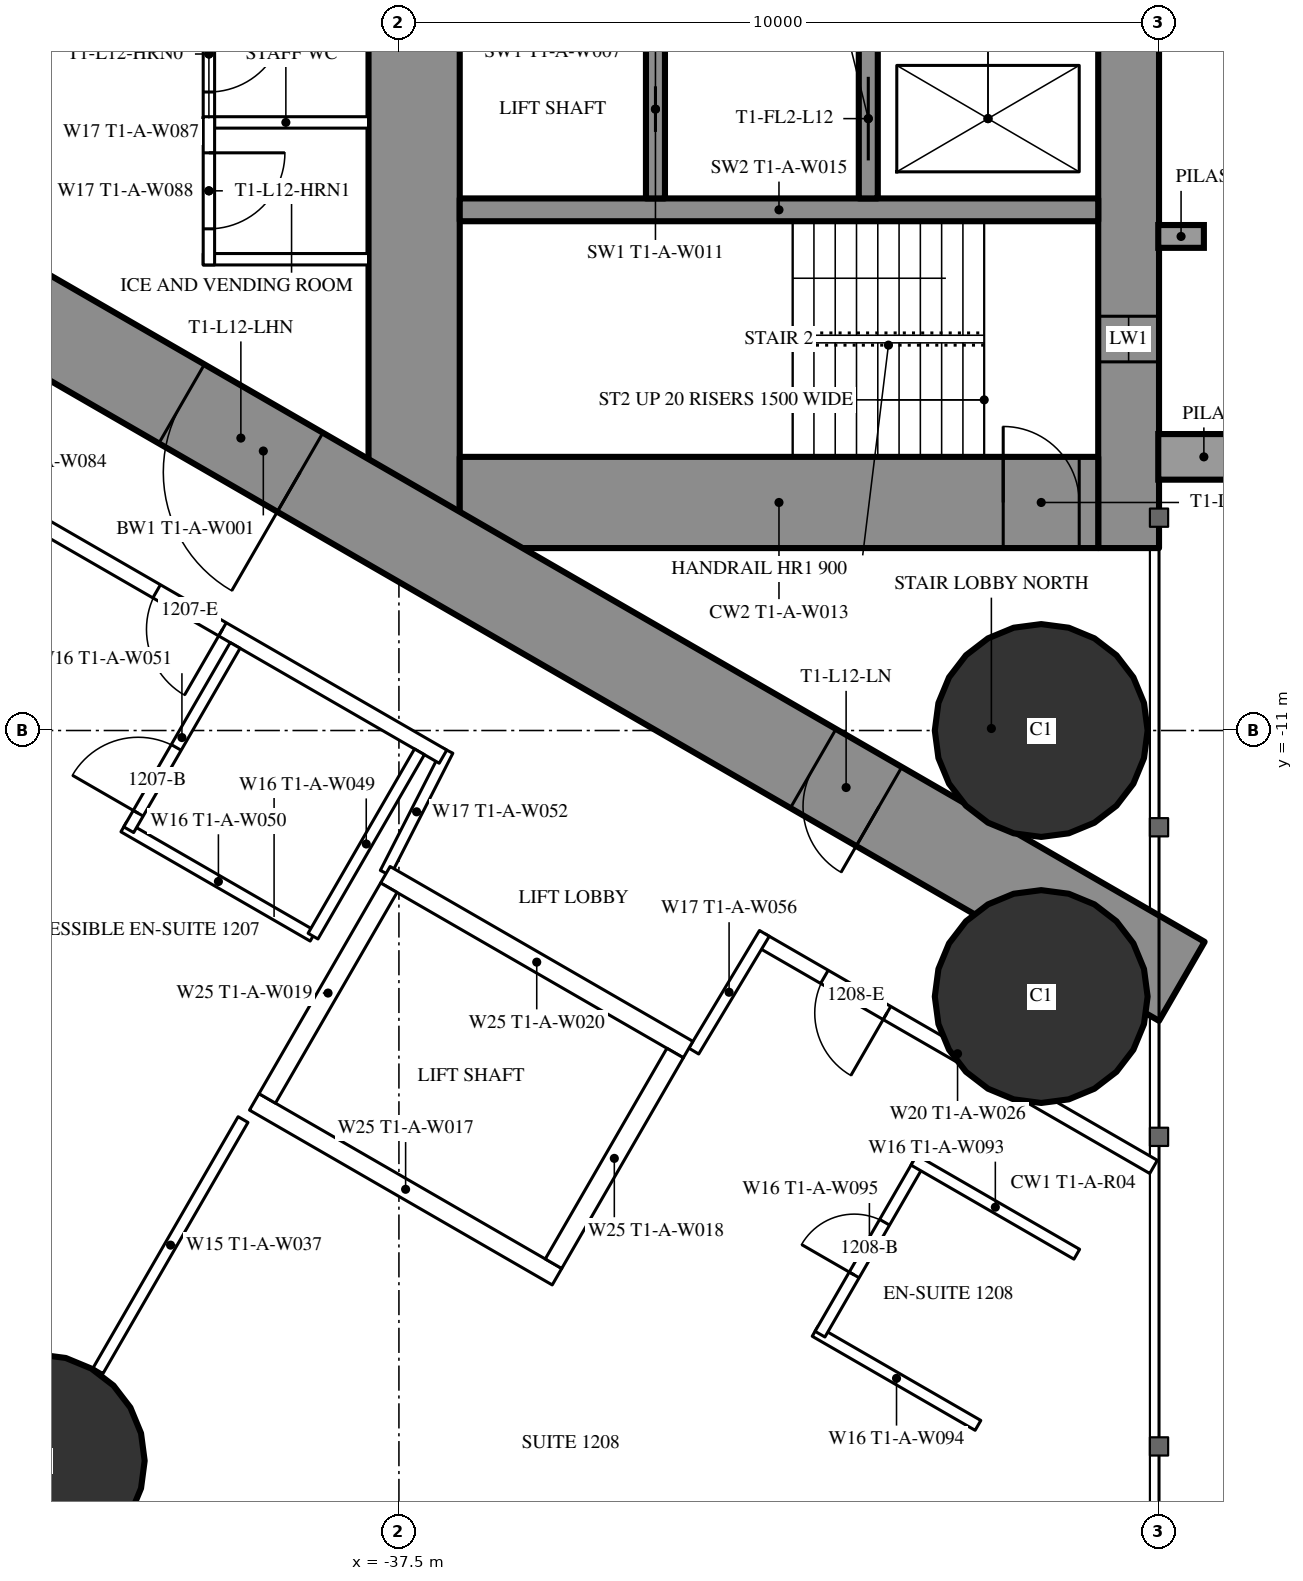
"""IFC4 building model, lengths in metres.
Left out: names, types, materials, properties, quantities, classifications, styles, units other than length and angle.
Written with IfcOpenShell. Run it as: python <this file> out.ifc"""

import sys

from ifc_helpers import new_model, si_unit, direction, frame, frame_2d, origin, origin_2d, place, context, subcontext, project, spatial, rectangle, hollow_circle, extrude, element, fill, save


model = new_model("IFC4")
c1 = context("Model", 3, precision=1e-05, world=origin(), true_north=direction((0.0, 1.0)))
c2 = subcontext(c1, "Body", "Model", "MODEL_VIEW")
j1 = project(units=[si_unit("LENGTHUNIT", "METRE"), si_unit("PLANEANGLEUNIT", "RADIAN")], contexts=[c1])
p1 = place(None, origin())
s1 = spatial("IfcSite", under=j1, at=p1, CompositionType="ELEMENT")
p2 = place(p1, origin())
s2 = spatial("IfcBuilding", under=s1, at=p2, CompositionType="ELEMENT")
p3 = place(p2, frame((0.0, 0.0, 49.5)))
s3 = spatial("IfcBuildingStorey", under=s2, at=p3, CompositionType="ELEMENT", Elevation=49.5)
for number, where, z_axis, x_axis in (
    (1, (-29.05, -11.0, 0.0), (0.0, 0.0, 1.0), (1.0, 0.0, 0.0)),
    (2, (-29.05, -14.5, 0.0), (0.0, 0.0, 1.0), (1.0, 0.0, 0.0)),
    (3, (-42.245, -20.607, 0.0), (0.0, 0.0, 1.0), (1.0, 0.0, 0.0)),
):
    element("IfcColumn", number, at=place(p3, frame(where, z_axis=z_axis, x_axis=x_axis)), inside=s3, PredefinedType="COLUMN", context=c2, shape_type="SweptSolid", body=[
        extrude(hollow_circle(Radius=1.4, WallThickness=0.12, at=origin_2d()), origin(), (0.0, 0.0, 1.0), 3.5),
    ])
p4 = place(p3, frame((-27.9, 8.6, 0.0), z_axis=(0.0, 0.0, 1.0), x_axis=(0.0, -1.0, 0.0)))
e4 = element("IfcWall", 4, at=p4, inside=s3, PredefinedType="SHEAR", context=c2, shape_type="SweptSolid", body=[
    extrude(rectangle(XDim=17.2, YDim=0.8, at=frame_2d((8.6, 0.0))), origin(), (0.0, 0.0, 1.0), 3.5),
])
p5 = place(p4, frame((2.45, 0.0, 0.6)))
e5 = element("IfcOpeningElement", 5, at=p5, cuts=e4, PredefinedType="OPENING", context=c2, shape_type="SweptSolid", body=[
    extrude(rectangle(XDim=0.6, YDim=2.1, at=frame_2d((0.3, 1.05))), frame((0.0, 0.41, 0.0), z_axis=(0.0, -1.0, 0.0), x_axis=(1.0, 0.0, 0.0)), (0.0, 0.0, 1.0), 0.82),
])
p6 = place(p4, frame((14.15, 0.0, 0.6)))
e6 = element("IfcOpeningElement", 6, at=p6, cuts=e4, PredefinedType="OPENING", context=c2, shape_type="SweptSolid", body=[
    extrude(rectangle(XDim=0.6, YDim=2.1, at=frame_2d((0.3, 1.05))), frame((0.0, 0.41, 0.0), z_axis=(0.0, -1.0, 0.0), x_axis=(1.0, 0.0, 0.0)), (0.0, 0.0, 1.0), 0.82),
])
p7 = place(p3, frame((-37.3, 8.6, 0.0), z_axis=(0.0, 0.0, 1.0), x_axis=(0.0, -1.0, 0.0)))
e7 = element("IfcWall", 7, at=p7, inside=s3, PredefinedType="SHEAR", context=c2, shape_type="SweptSolid", body=[
    extrude(rectangle(XDim=17.2, YDim=1.2, at=frame_2d((8.6, 0.0))), origin(), (0.0, 0.0, 1.0), 3.5),
])
p8 = place(p7, frame((7.7, 0.0, 0.0)))
e8 = element("IfcOpeningElement", 8, at=p8, cuts=e7, PredefinedType="OPENING", context=c2, shape_type="SweptSolid", body=[
    extrude(rectangle(XDim=1.8, YDim=2.2, at=frame_2d((0.9, 1.1))), frame((0.0, 0.61, 0.0), z_axis=(0.0, -1.0, 0.0), x_axis=(1.0, 0.0, 0.0)), (0.0, 0.0, 1.0), 1.22),
])
p9 = place(p3, frame((-28.3, -8.0, 0.0), z_axis=(0.0, 0.0, 1.0), x_axis=(-1.0, 0.0, 0.0)))
e9 = element("IfcWall", 9, at=p9, inside=s3, PredefinedType="SHEAR", context=c2, shape_type="SweptSolid", body=[
    extrude(rectangle(XDim=8.4, YDim=1.2, at=frame_2d((4.2, 0.0))), origin(), (0.0, 0.0, 1.0), 3.5),
])
p10 = place(p9, frame((0.25, 0.0, 0.0)))
e10 = element("IfcOpeningElement", 10, at=p10, cuts=e9, PredefinedType="OPENING", context=c2, shape_type="SweptSolid", body=[
    extrude(rectangle(XDim=1.0, YDim=2.2, at=frame_2d((0.5, 1.1))), frame((0.0, 0.61, 0.0), z_axis=(0.0, -1.0, 0.0), x_axis=(1.0, 0.0, 0.0)), (0.0, 0.0, 1.0), 1.22),
])
p11 = place(p3, frame((-28.3, -4.15, 0.0), z_axis=(0.0, 0.0, 1.0), x_axis=(-1.0, 0.0, 0.0)))
e11 = element("IfcWall", 11, at=p11, inside=s3, PredefinedType="SHEAR", context=c2, shape_type="SweptSolid", body=[
    extrude(rectangle(XDim=8.4, YDim=0.3, at=frame_2d((4.2, 0.0))), origin(), (0.0, 0.0, 1.0), 3.5),
])
p12 = place(p3, frame((-31.325, -1.9, 0.0), z_axis=(0.0, 0.0, 1.0), x_axis=(0.0, -1.0, 0.0)))
e12 = element("IfcWall", 12, at=p12, inside=s3, PredefinedType="SHEAR", context=c2, shape_type="SweptSolid", body=[
    extrude(rectangle(XDim=2.1, YDim=0.25, at=frame_2d((1.05, 0.0))), origin(), (0.0, 0.0, 1.0), 3.5),
])
p13 = place(p12, frame((0.5, 0.0, 0.0)))
e13 = element("IfcOpeningElement", 13, at=p13, cuts=e12, PredefinedType="OPENING", context=c2, shape_type="SweptSolid", body=[
    extrude(rectangle(XDim=1.1, YDim=2.2, at=frame_2d((0.55, 1.1))), frame((0.0, 0.135, 0.0), z_axis=(0.0, -1.0, 0.0), x_axis=(1.0, 0.0, 0.0)), (0.0, 0.0, 1.0), 0.27),
])
p14 = place(p3, frame((-34.125, -1.65, 0.0), z_axis=(0.0, 0.0, 1.0), x_axis=(0.0, -1.0, 0.0)))
e14 = element("IfcWall", 14, at=p14, inside=s3, PredefinedType="SHEAR", context=c2, shape_type="SweptSolid", body=[
    extrude(rectangle(XDim=2.35, YDim=0.25, at=frame_2d((1.175, 0.0))), origin(), (0.0, 0.0, 1.0), 3.5),
])
p15 = place(p14, frame((0.875, 0.0, 0.0)))
e15 = element("IfcOpeningElement", 15, at=p15, cuts=e14, PredefinedType="OPENING", context=c2, shape_type="SweptSolid", body=[
    extrude(rectangle(XDim=0.6, YDim=2.0, at=frame_2d((0.3, 1.0))), frame((0.0, 0.135, 0.0), z_axis=(0.0, -1.0, 0.0), x_axis=(1.0, 0.0, 0.0)), (0.0, 0.0, 1.0), 0.27),
])
p16 = place(p3, frame((-27.2, -14.3, 0.0), z_axis=(0.0, 0.0, 1.0), x_axis=(-0.866024021859, 0.500002393557, 0.0)))
e16 = element("IfcWall", 16, at=p16, inside=s3, PredefinedType="SHEAR", context=c2, shape_type="SweptSolid", body=[
    extrude(rectangle(XDim=27.907, YDim=1.2, at=frame_2d((13.954, 0.0))), origin(), (0.0, 0.0, 1.0), 3.5),
])
p17 = place(p16, frame((4.6, 0.0, 0.0)))
e17 = element("IfcOpeningElement", 17, at=p17, cuts=e16, PredefinedType="OPENING", context=c2, shape_type="SweptSolid", body=[
    extrude(rectangle(XDim=1.0, YDim=2.2, at=frame_2d((0.5, 1.1))), frame((0.0, 0.61, 0.0), z_axis=(0.0, -1.0, 0.0), x_axis=(1.0, 0.0, 0.0)), (0.0, 0.0, 1.0), 1.22),
])
p18 = place(p16, frame((13.395, 0.0, 0.0)))
e18 = element("IfcOpeningElement", 18, at=p18, cuts=e16, PredefinedType="OPENING", context=c2, shape_type="SweptSolid", body=[
    extrude(rectangle(XDim=1.8, YDim=2.2, at=frame_2d((0.9, 1.1))), frame((0.0, 0.61, 0.0), z_axis=(0.0, -1.0, 0.0), x_axis=(1.0, 0.0, 0.0)), (0.0, 0.0, 1.0), 1.22),
])
p19 = place(p3, frame((-39.551, -16.118, 0.0), z_axis=(0.0, 0.0, 1.0), x_axis=(-0.499986503906, -0.866033195618, 0.0)))
e19 = element("IfcWall", 19, at=p19, inside=s3, PredefinedType="PARTITIONING", context=c2, shape_type="SweptSolid", body=[
    extrude(rectangle(XDim=3.815, YDim=0.15, at=frame_2d((1.907, 0.0))), origin(), (0.0, 0.0, 1.0), 3.25),
])
p20 = place(p3, frame((-27.572, -16.741, 0.0), z_axis=(0.0, 0.0, 1.0), x_axis=(-0.866024464444, 0.500001626982, 0.0)))
e20 = element("IfcWall", 20, at=p20, inside=s3, PredefinedType="PARTITIONING", context=c2, shape_type="SweptSolid", body=[
    extrude(rectangle(XDim=5.955, YDim=0.2, at=frame_2d((2.978, 0.0))), origin(), (0.0, 0.0, 1.0), 3.25),
])
p21 = place(p20, frame((4.05, 0.0, 0.0)))
e21 = element("IfcOpeningElement", 21, at=p21, cuts=e20, PredefinedType="OPENING", context=c2, shape_type="SweptSolid", body=[
    extrude(rectangle(XDim=0.95, YDim=2.2, at=frame_2d((0.475, 1.1))), frame((0.0, 0.11, 0.0), z_axis=(0.0, -1.0, 0.0), x_axis=(1.0, 0.0, 0.0)), (0.0, 0.0, 1.0), 0.22),
])
p22 = place(p3, frame((-36.857, -11.265, 0.0), z_axis=(0.0, 0.0, 1.0), x_axis=(-0.454225294761, -0.890886851176, 0.0)))
e22 = element("IfcWall", 22, at=p22, inside=s3, PredefinedType="PARTITIONING", context=c2, shape_type="SweptSolid", body=[
    extrude(rectangle(XDim=1.807, YDim=0.15, at=frame_2d((0.904, 0.0))), origin(), (0.0, 0.0, 1.0), 3.25),
])
p23 = place(p3, frame((-33.621, -15.218, 0.0), z_axis=(0.0, 0.0, 1.0), x_axis=(0.514336634837, 0.857588377991, 0.0)))
e23 = element("IfcWall", 23, at=p23, inside=s3, PredefinedType="PARTITIONING", context=c2, shape_type="SweptSolid", body=[
    extrude(rectangle(XDim=1.805, YDim=0.15, at=frame_2d((0.903, 0.0))), origin(), (0.0, 0.0, 1.0), 3.25),
])
p24 = place(p3, frame((-36.92, -11.344, 0.0), z_axis=(0.0, 0.0, 1.0), x_axis=(-0.866025017052, 0.500000669839, 0.0)))
e24 = element("IfcWall", 24, at=p24, inside=s3, PredefinedType="PARTITIONING", context=c2, shape_type="SweptSolid", body=[
    extrude(rectangle(XDim=12.28, YDim=0.2, at=frame_2d((6.14, 0.0))), origin(), (0.0, 0.0, 1.0), 3.25),
])
p25 = place(p24, frame((3.35, 0.0, 0.0)))
e25 = element("IfcOpeningElement", 25, at=p25, cuts=e24, PredefinedType="OPENING", context=c2, shape_type="SweptSolid", body=[
    extrude(rectangle(XDim=1.0, YDim=2.2, at=frame_2d((0.5, 1.1))), frame((0.0, 0.11, 0.0), z_axis=(0.0, -1.0, 0.0), x_axis=(1.0, 0.0, 0.0)), (0.0, 0.0, 1.0), 0.22),
])
p26 = place(p3, frame((-38.63, -13.705, 0.0), z_axis=(0.0, 0.0, 1.0), x_axis=(-0.866018712932, 0.500011588718, 0.0)))
e26 = element("IfcWall", 26, at=p26, inside=s3, PredefinedType="PARTITIONING", context=c2, shape_type="SweptSolid", body=[
    extrude(rectangle(XDim=2.875, YDim=0.15, at=frame_2d((1.438, 0.0))), origin(), (0.0, 0.0, 1.0), 3.25),
])
p27 = place(p3, frame((-39.655, -9.88, 0.0), z_axis=(0.0, 0.0, 1.0), x_axis=(-0.500049511043, -0.865996816683, 0.0)))
e27 = element("IfcWall", 27, at=p27, inside=s3, PredefinedType="PARTITIONING", context=c2, shape_type="SweptSolid", body=[
    extrude(rectangle(XDim=2.8, YDim=0.15, at=frame_2d((1.4, 0.0))), origin(), (0.0, 0.0, 1.0), 3.25),
])
p28 = place(p27, frame((1.55, 0.0, 0.0)))
e28 = element("IfcOpeningElement", 28, at=p28, cuts=e27, PredefinedType="OPENING", context=c2, shape_type="SweptSolid", body=[
    extrude(rectangle(XDim=1.0, YDim=2.2, at=frame_2d((0.5, 1.1))), frame((0.0, 0.085, 0.0), z_axis=(0.0, -1.0, 0.0), x_axis=(1.0, 0.0, 0.0)), (0.0, 0.0, 1.0), 0.17),
])
p29 = place(p3, frame((-37.23, -11.281, 0.0), z_axis=(0.0, 0.0, 1.0), x_axis=(-0.500049511043, -0.865996816683, 0.0)))
e29 = element("IfcWall", 29, at=p29, inside=s3, PredefinedType="PARTITIONING", context=c2, shape_type="SweptSolid", body=[
    extrude(rectangle(XDim=2.8, YDim=0.15, at=frame_2d((1.4, 0.0))), origin(), (0.0, 0.0, 1.0), 3.25),
])
p30 = place(p3, frame((-29.882, -20.142, 0.0), z_axis=(0.0, 0.0, 1.0), x_axis=(-0.866031185235, 0.4999899861, 0.0)))
e30 = element("IfcWall", 30, at=p30, inside=s3, PredefinedType="PARTITIONING", context=c2, shape_type="SweptSolid", body=[
    extrude(rectangle(XDim=2.475, YDim=0.15, at=frame_2d((1.238, 0.0))), origin(), (0.0, 0.0, 1.0), 3.25),
])
p31 = place(p3, frame((-30.66, -16.69, 0.0), z_axis=(0.0, 0.0, 1.0), x_axis=(-0.499936506574, -0.866062058628, 0.0)))
e31 = element("IfcWall", 31, at=p31, inside=s3, PredefinedType="PARTITIONING", context=c2, shape_type="SweptSolid", body=[
    extrude(rectangle(XDim=2.6, YDim=0.15, at=frame_2d((1.3, 0.0))), origin(), (0.0, 0.0, 1.0), 3.25),
])
p32 = place(p31, frame((0.9, 0.0, 0.0)))
e32 = element("IfcOpeningElement", 32, at=p32, cuts=e31, PredefinedType="OPENING", context=c2, shape_type="SweptSolid", body=[
    extrude(rectangle(XDim=0.8, YDim=2.2, at=frame_2d((0.4, 1.1))), frame((0.0, 0.085, 0.0), z_axis=(0.0, -1.0, 0.0), x_axis=(1.0, 0.0, 0.0)), (0.0, 0.0, 1.0), 0.17),
])
p33 = place(p3, frame((-28.582, -17.89, 0.0), z_axis=(0.0, 0.0, 1.0), x_axis=(-0.866073894602, 0.499916002032, 0.0)))
e33 = element("IfcWall", 33, at=p33, inside=s3, PredefinedType="PARTITIONING", context=c2, shape_type="SweptSolid", body=[
    extrude(rectangle(XDim=2.475, YDim=0.15, at=frame_2d((1.238, 0.0))), origin(), (0.0, 0.0, 1.0), 3.25),
])
for number, where, z_axis, x_axis in (
    (34, (-37.9, -3.0, 0.0), (0.0, 0.0, 1.0), (-1.0, 0.0, 0.0)),
    (35, (-37.9, -4.8, 0.0), (0.0, 0.0, 1.0), (-1.0, 0.0, 0.0)),
):
    element("IfcWall", number, at=place(p3, frame(where, z_axis=z_axis, x_axis=x_axis)), inside=s3, PredefinedType="PARTITIONING", context=c2, shape_type="SweptSolid", body=[
        extrude(rectangle(XDim=2.175, YDim=0.15, at=frame_2d((1.087, 0.0))), origin(), (0.0, 0.0, 1.0), 3.25),
    ])
p34 = place(p3, frame((-40.0, -1.125, 0.0), z_axis=(0.0, 0.0, 1.0), x_axis=(0.0, -1.0, 0.0)))
e36 = element("IfcWall", 36, at=p34, inside=s3, PredefinedType="PARTITIONING", context=c2, shape_type="SweptSolid", body=[
    extrude(rectangle(XDim=1.95, YDim=0.15, at=frame_2d((0.975, 0.0))), origin(), (0.0, 0.0, 1.0), 3.25),
])
p35 = place(p34, frame((0.475, 0.0, 0.0)))
e37 = element("IfcOpeningElement", 37, at=p35, cuts=e36, PredefinedType="OPENING", context=c2, shape_type="SweptSolid", body=[
    extrude(rectangle(XDim=1.0, YDim=2.2, at=frame_2d((0.5, 1.1))), frame((0.0, 0.085, 0.0), z_axis=(0.0, -1.0, 0.0), x_axis=(1.0, 0.0, 0.0)), (0.0, 0.0, 1.0), 0.17),
])
p36 = place(p3, frame((-40.0, -2.925, 0.0), z_axis=(0.0, 0.0, 1.0), x_axis=(0.0, -1.0, 0.0)))
e38 = element("IfcWall", 38, at=p36, inside=s3, PredefinedType="PARTITIONING", context=c2, shape_type="SweptSolid", body=[
    extrude(rectangle(XDim=1.95, YDim=0.15, at=frame_2d((0.975, 0.0))), origin(), (0.0, 0.0, 1.0), 3.25),
])
p37 = place(p36, frame((0.475, 0.0, 0.0)))
e39 = element("IfcOpeningElement", 39, at=p37, cuts=e38, PredefinedType="OPENING", context=c2, shape_type="SweptSolid", body=[
    extrude(rectangle(XDim=1.0, YDim=2.2, at=frame_2d((0.5, 1.1))), frame((0.0, 0.085, 0.0), z_axis=(0.0, -1.0, 0.0), x_axis=(1.0, 0.0, 0.0)), (0.0, 0.0, 1.0), 0.17),
])
p38 = place(p3, frame((-33.696, -15.197, 0.0), z_axis=(0.0, 0.0, 1.0), x_axis=(-0.865976953817, 0.500083908417, 0.0)))
e40 = element("IfcWall", 40, at=p38, inside=s3, PredefinedType="PARTITIONING", context=c2, shape_type="SweptSolid", body=[
    extrude(rectangle(XDim=4.599, YDim=0.25, at=frame_2d((2.3, 0.0))), origin(), (0.0, 0.0, 1.0), 3.25),
])
p39 = place(p3, frame((-35.42, -18.186, 0.0), z_axis=(0.0, 0.0, 1.0), x_axis=(-0.865990227814, 0.50006092162, 0.0)))
e41 = element("IfcWall", 41, at=p39, inside=s3, PredefinedType="PARTITIONING", context=c2, shape_type="SweptSolid", body=[
    extrude(rectangle(XDim=4.6, YDim=0.25, at=frame_2d((2.3, 0.0))), origin(), (0.0, 0.0, 1.0), 3.25),
])
p40 = place(p3, frame((-33.866, -15.243, 0.0), z_axis=(0.0, 0.0, 1.0), x_axis=(-0.499929347863, -0.866066190972, 0.0)))
e42 = element("IfcWall", 42, at=p40, inside=s3, PredefinedType="PARTITIONING", context=c2, shape_type="SweptSolid", body=[
    extrude(rectangle(XDim=3.201, YDim=0.25, at=frame_2d((1.6, 0.0))), origin(), (0.0, 0.0, 1.0), 3.25),
])
p41 = place(p3, frame((-37.633, -13.068, 0.0), z_axis=(0.0, 0.0, 1.0), x_axis=(-0.499872130319, -0.866099216793, 0.0)))
e43 = element("IfcWall", 43, at=p41, inside=s3, PredefinedType="PARTITIONING", context=c2, shape_type="SweptSolid", body=[
    extrude(rectangle(XDim=3.2, YDim=0.25, at=frame_2d((1.6, 0.0))), origin(), (0.0, 0.0, 1.0), 3.25),
])
p42 = place(p28, origin())
e44 = element("IfcDoor", 44, at=p42, inside=s3, OperationType="SINGLE_SWING_RIGHT", PredefinedType="DOOR", context=c2, shape_type="SweptSolid", body=[
    extrude(rectangle(XDim=1.0, YDim=2.2, at=frame_2d((0.5, 1.1))), frame((0.0, 0.025, 0.0), z_axis=(0.0, -1.0, 0.0), x_axis=(1.0, 0.0, 0.0)), (0.0, 0.0, 1.0), 0.05),
])
fill(e28, e44)
p43 = place(p25, origin())
e45 = element("IfcDoor", 45, at=p43, inside=s3, OperationType="SINGLE_SWING_LEFT", PredefinedType="DOOR", context=c2, shape_type="SweptSolid", body=[
    extrude(rectangle(XDim=1.0, YDim=2.2, at=frame_2d((0.5, 1.1))), frame((0.0, 0.025, 0.0), z_axis=(0.0, -1.0, 0.0), x_axis=(1.0, 0.0, 0.0)), (0.0, 0.0, 1.0), 0.05),
])
fill(e25, e45)
p44 = place(p32, origin())
e46 = element("IfcDoor", 46, at=p44, inside=s3, OperationType="SINGLE_SWING_RIGHT", PredefinedType="DOOR", context=c2, shape_type="SweptSolid", body=[
    extrude(rectangle(XDim=0.8, YDim=2.2, at=frame_2d((0.4, 1.1))), frame((0.0, 0.025, 0.0), z_axis=(0.0, -1.0, 0.0), x_axis=(1.0, 0.0, 0.0)), (0.0, 0.0, 1.0), 0.05),
])
fill(e32, e46)
p45 = place(p21, origin())
e47 = element("IfcDoor", 47, at=p45, inside=s3, OperationType="SINGLE_SWING_LEFT", PredefinedType="DOOR", context=c2, shape_type="SweptSolid", body=[
    extrude(rectangle(XDim=0.95, YDim=2.2, at=frame_2d((0.475, 1.1))), frame((0.0, 0.025, 0.0), z_axis=(0.0, -1.0, 0.0), x_axis=(1.0, 0.0, 0.0)), (0.0, 0.0, 1.0), 0.05),
])
fill(e21, e47)
p46 = place(p35, origin())
e48 = element("IfcDoor", 48, at=p46, inside=s3, OperationType="SINGLE_SWING_LEFT", PredefinedType="DOOR", context=c2, shape_type="SweptSolid", body=[
    extrude(rectangle(XDim=1.0, YDim=2.2, at=frame_2d((0.5, 1.1))), frame((0.0, 0.025, 0.0), z_axis=(0.0, -1.0, 0.0), x_axis=(1.0, 0.0, 0.0)), (0.0, 0.0, 1.0), 0.05),
])
fill(e37, e48)
p47 = place(p37, origin())
e49 = element("IfcDoor", 49, at=p47, inside=s3, OperationType="SINGLE_SWING_LEFT", PredefinedType="DOOR", context=c2, shape_type="SweptSolid", body=[
    extrude(rectangle(XDim=1.0, YDim=2.2, at=frame_2d((0.5, 1.1))), frame((0.0, 0.025, 0.0), z_axis=(0.0, -1.0, 0.0), x_axis=(1.0, 0.0, 0.0)), (0.0, 0.0, 1.0), 0.05),
])
fill(e39, e49)
p48 = place(p17, origin())
e50 = element("IfcDoor", 50, at=p48, inside=s3, OperationType="SINGLE_SWING_LEFT", PredefinedType="DOOR", context=c2, shape_type="SweptSolid", body=[
    extrude(rectangle(XDim=1.0, YDim=2.2, at=frame_2d((0.5, 1.1))), frame((0.0, 0.025, 0.0), z_axis=(0.0, -1.0, 0.0), x_axis=(1.0, 0.0, 0.0)), (0.0, 0.0, 1.0), 0.05),
])
fill(e17, e50)
p49 = place(p18, origin())
e51 = element("IfcDoor", 51, at=p49, inside=s3, OperationType="DOUBLE_DOOR_SINGLE_SWING", PredefinedType="DOOR", context=c2, shape_type="SweptSolid", body=[
    extrude(rectangle(XDim=1.8, YDim=2.2, at=frame_2d((0.9, 1.1))), frame((0.0, 0.025, 0.0), z_axis=(0.0, -1.0, 0.0), x_axis=(1.0, 0.0, 0.0)), (0.0, 0.0, 1.0), 0.05),
])
fill(e18, e51)
p50 = place(p10, origin())
e52 = element("IfcDoor", 52, at=p50, inside=s3, OperationType="SINGLE_SWING_RIGHT", PredefinedType="DOOR", context=c2, shape_type="SweptSolid", body=[
    extrude(rectangle(XDim=1.0, YDim=2.2, at=frame_2d((0.5, 1.1))), frame((0.0, 0.025, 0.0), z_axis=(0.0, -1.0, 0.0), x_axis=(1.0, 0.0, 0.0)), (0.0, 0.0, 1.0), 0.05),
])
fill(e10, e52)
p51 = place(p13, origin())
e53 = element("IfcDoor", 53, at=p51, inside=s3, OperationType="SLIDING_TO_LEFT", PredefinedType="USERDEFINED", context=c2, shape_type="SweptSolid", body=[
    extrude(rectangle(XDim=1.1, YDim=2.2, at=frame_2d((0.55, 1.1))), frame((0.0, 0.025, 0.0), z_axis=(0.0, -1.0, 0.0), x_axis=(1.0, 0.0, 0.0)), (0.0, 0.0, 1.0), 0.05),
])
fill(e13, e53)
p52 = place(p15, origin())
e54 = element("IfcDoor", 54, at=p52, inside=s3, OperationType="SLIDING_TO_LEFT", PredefinedType="DOOR", context=c2, shape_type="SweptSolid", body=[
    extrude(rectangle(XDim=0.6, YDim=2.0, at=frame_2d((0.3, 1.0))), frame((0.0, 0.025, 0.0), z_axis=(0.0, -1.0, 0.0), x_axis=(1.0, 0.0, 0.0)), (0.0, 0.0, 1.0), 0.05),
])
fill(e15, e54)
p53 = place(p6, origin())
e55 = element("IfcWindow", 55, at=p53, inside=s3, PartitioningType="SINGLE_PANEL", PredefinedType="WINDOW", context=c2, shape_type="SweptSolid", body=[
    extrude(rectangle(XDim=0.6, YDim=2.1, at=frame_2d((0.3, 1.05))), frame((0.0, 0.03, 0.0), z_axis=(0.0, -1.0, 0.0), x_axis=(1.0, 0.0, 0.0)), (0.0, 0.0, 1.0), 0.06),
])
fill(e6, e55)
save(model, sys.argv[1])
